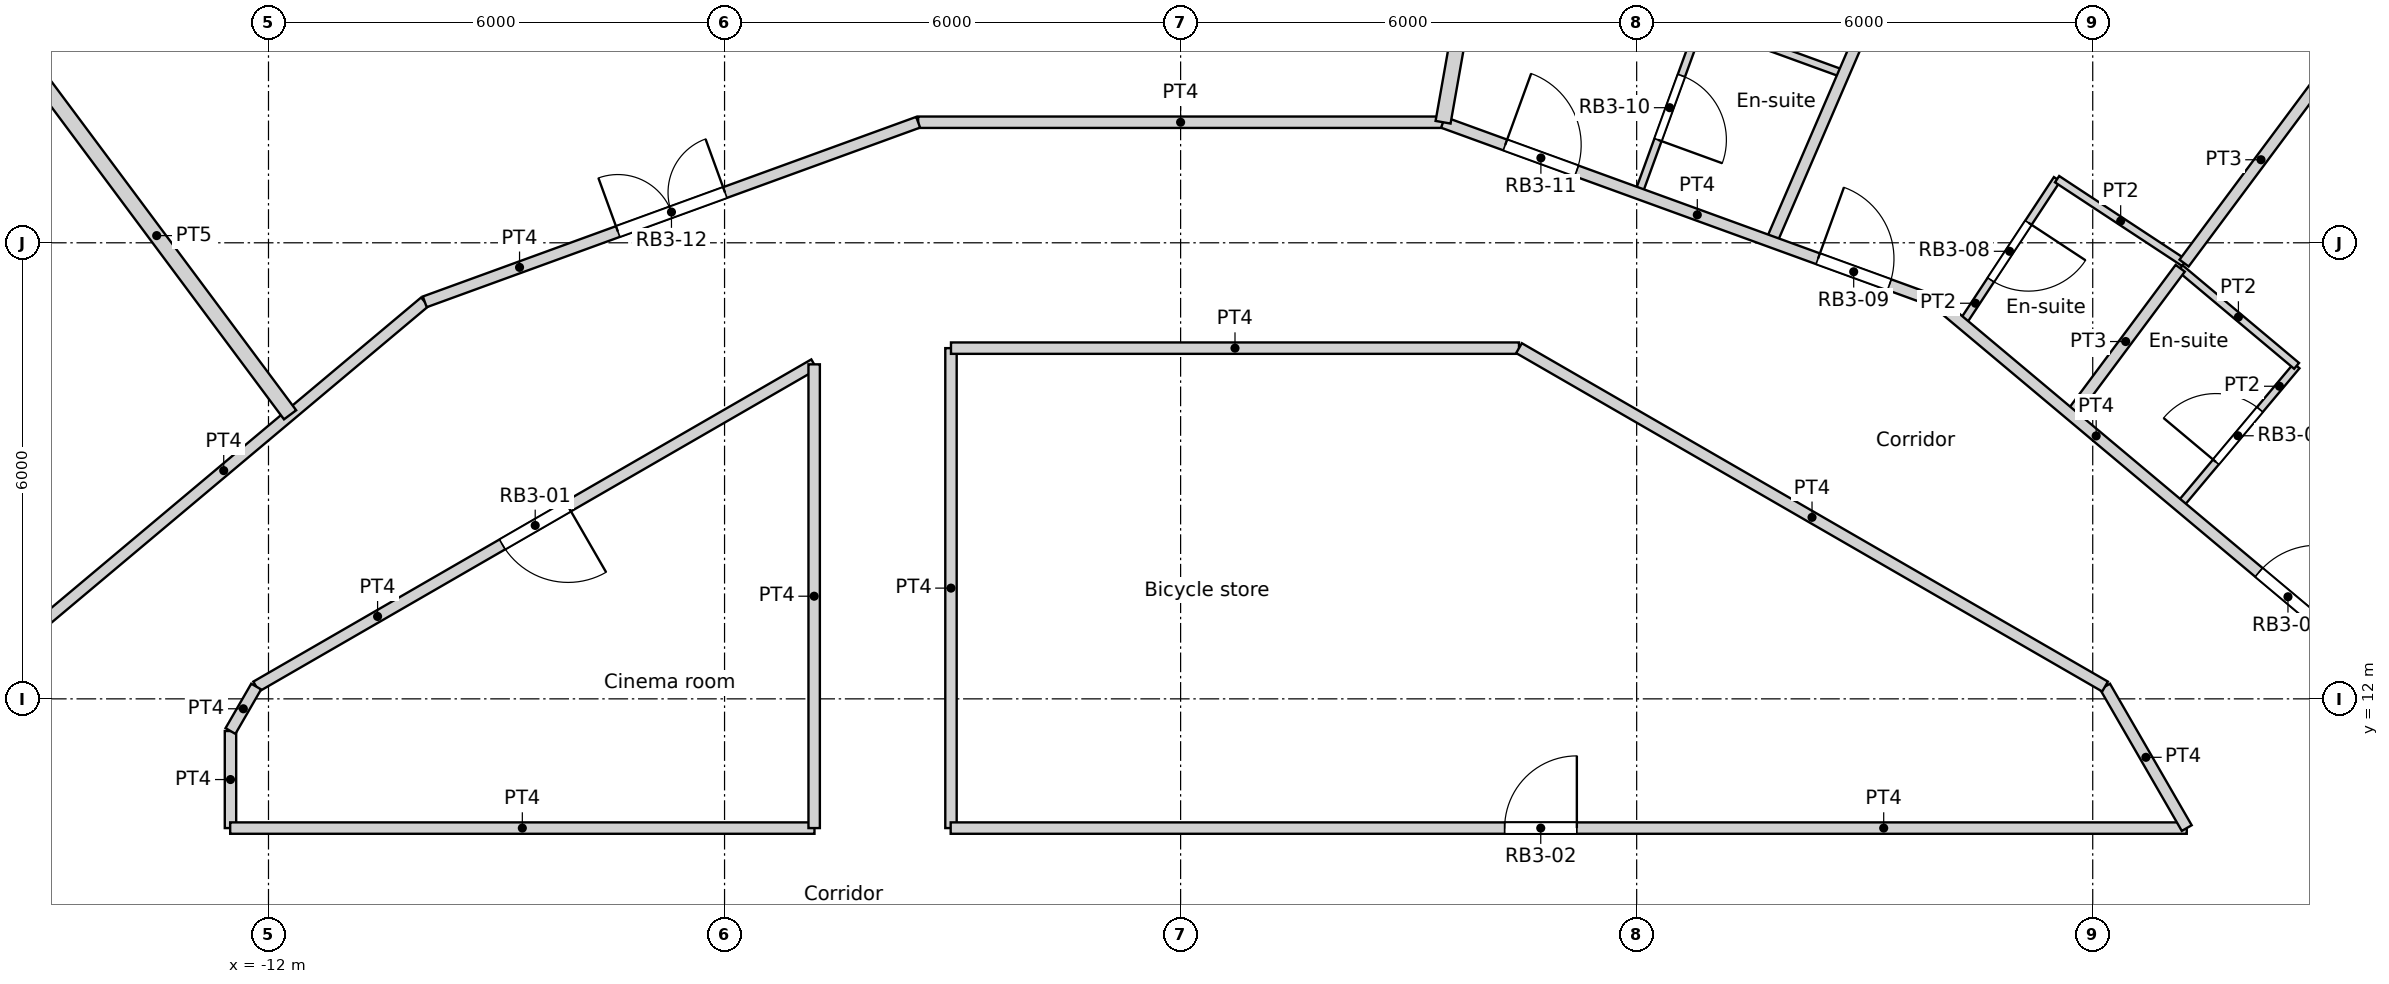
"""IFC4 building model, lengths in metres.
Left out: names, types, materials, properties, quantities, classifications, styles, units other than length and angle.
Written with IfcOpenShell. Run it as: python <this file> out.ifc"""

import sys

from ifc_helpers import new_model, si_unit, direction, frame, frame_2d, origin, origin_2d, place, context, subcontext, project, spatial, rectangle, circle, extrude, element, fill, save


model = new_model("IFC4")
c1 = context("Model", 3, precision=1e-05, world=origin(), true_north=direction((0.0, 1.0)))
c2 = subcontext(c1, "Body", "Model", "MODEL_VIEW")
j1 = project(units=[si_unit("LENGTHUNIT", "METRE"), si_unit("PLANEANGLEUNIT", "RADIAN")], contexts=[c1])
p1 = place(None, origin())
s1 = spatial("IfcSite", under=j1, at=p1, CompositionType="ELEMENT")
p2 = place(p1, origin())
s2 = spatial("IfcBuilding", under=s1, at=p2, CompositionType="ELEMENT")
p3 = place(p2, frame((0.0, 0.0, 147.6)))
s3 = spatial("IfcBuildingStorey", under=s2, at=p3, CompositionType="ELEMENT", Elevation=147.6)
p4 = place(p3, frame((14.659, 19.69, 0.0), z_axis=(0.0, 0.0, 1.0), x_axis=(1.0, 0.0, 0.0)))
e1 = element("IfcColumn", 1, at=p4, inside=s3, PredefinedType="COLUMN", context=c2, shape_type="SweptSolid", body=[
    extrude(circle(Radius=0.6, at=origin_2d()), origin(), (0.0, 0.0, 1.0), 3.6),
])
for number, where, z_axis, x_axis in (
    (2, (11.735, 14.716, 0.0), (0.0, 0.0, 1.0), (1.0, 0.0, 0.0)),
    (3, (6.876, 17.521, 0.0), (0.0, 0.0, 1.0), (1.0, 0.0, 0.0)),
    (4, (1.406, 18.77, 0.0), (0.0, 0.0, 1.0), (1.0, 0.0, 0.0)),
    (5, (-4.188, 18.35, 0.0), (0.0, 0.0, 1.0), (1.0, 0.0, 0.0)),
    (6, (-9.411, 16.301, 0.0), (0.0, 0.0, 1.0), (1.0, 0.0, 0.0)),
    (7, (-13.798, 12.802, 0.0), (0.0, 0.0, 1.0), (1.0, 0.0, 0.0)),
):
    element("IfcColumn", number, at=place(p3, frame(where, z_axis=z_axis, x_axis=x_axis)), inside=s3, PredefinedType="COLUMN", context=c2, shape_type="SweptSolid", body=[
        extrude(circle(Radius=0.65, at=origin_2d()), origin(), (0.0, 0.0, 1.0), 3.6),
    ])
p5 = place(p3, frame((15.316, 20.573, 0.0), z_axis=(0.0, 0.0, 1.0), x_axis=(-0.835508361394, 0.54947773207, 0.0)))
e8 = element("IfcWall", 8, at=p5, inside=s3, PredefinedType="SOLIDWALL", context=c2, shape_type="SweptSolid", body=[
    extrude(rectangle(XDim=2.973, YDim=0.3, at=frame_2d((1.486, 0.0))), origin(), (0.0, 0.0, 1.0), 3.3),
])
p6 = place(p5, frame((1.486, 0.0, 1.55)))
e9 = element("IfcOpeningElement", 9, at=p6, cuts=e8, PredefinedType="OPENING", context=c2, shape_type="SweptSolid", body=[
    extrude(circle(Radius=0.9, at=origin_2d()), frame((0.0, 0.16, 0.0), z_axis=(0.0, -1.0, 0.0), x_axis=(1.0, 0.0, 0.0)), (0.0, 0.0, 1.0), 0.32),
])
p7 = place(p3, frame((-13.132, 22.697, -0.3), z_axis=(0.0, 0.0, 1.0), x_axis=(-0.835514416706, -0.549468524554, 0.0)))
e10 = element("IfcWall", 10, at=p7, inside=s3, PredefinedType="ELEMENTEDWALL", context=c2, shape_type="SweptSolid", body=[
    extrude(rectangle(XDim=3.0, YDim=1.45, at=frame_2d((1.5, 0.0))), origin(), (0.0, 0.0, 1.0), 3.6),
])
p8 = place(p7, frame((1.5, 0.0, 1.85)))
e11 = element("IfcOpeningElement", 11, at=p8, cuts=e10, PredefinedType="OPENING", context=c2, shape_type="SweptSolid", body=[
    extrude(circle(Radius=0.9, at=origin_2d()), frame((0.0, 0.735, 0.0), z_axis=(0.0, -1.0, 0.0), x_axis=(1.0, 0.0, 0.0)), (0.0, 0.0, 1.0), 1.47),
])
p9 = place(p3, frame((-12.504, 10.3, 0.0), z_axis=(0.0, 0.0, 1.0), x_axis=(1.0, 0.0, 0.0)))
e12 = element("IfcWall", 12, at=p9, inside=s3, PredefinedType="PARTITIONING", context=c2, shape_type="SweptSolid", body=[
    extrude(rectangle(XDim=7.687, YDim=0.15, at=frame_2d((3.844, 0.0))), origin(), (0.0, 0.0, 1.0), 3.3),
])
p10 = place(p3, frame((-3.025, 10.3, 0.0), z_axis=(0.0, 0.0, 1.0), x_axis=(1.0, 0.0, 0.0)))
e13 = element("IfcWall", 13, at=p10, inside=s3, PredefinedType="PARTITIONING", context=c2, shape_type="SweptSolid", body=[
    extrude(rectangle(XDim=16.262, YDim=0.15, at=frame_2d((8.131, 0.0))), origin(), (0.0, 0.0, 1.0), 3.3),
])
p11 = place(p10, frame((7.288, 0.0, 0.0)))
e14 = element("IfcOpeningElement", 14, at=p11, cuts=e13, PredefinedType="OPENING", context=c2, shape_type="SweptSolid", body=[
    extrude(rectangle(XDim=0.95, YDim=2.1, at=frame_2d((0.475, 1.05))), frame((0.0, 0.075, 0.0), z_axis=(0.0, -1.0, 0.0), x_axis=(1.0, 0.0, 0.0)), (0.0, 0.0, 1.0), 0.15),
])
p12 = place(p3, frame((12.162, 12.162, 0.0), z_axis=(0.0, 0.0, 1.0), x_axis=(0.499961633463, -0.866047553582, 0.0)))
e15 = element("IfcWall", 15, at=p12, inside=s3, PredefinedType="PARTITIONING", context=c2, shape_type="SweptSolid", body=[
    extrude(rectangle(XDim=2.15, YDim=0.15, at=frame_2d((1.075, 0.0))), origin(), (0.0, 0.0, 1.0), 3.3),
])
p13 = place(p3, frame((9.943, 17.222, 0.0), z_axis=(0.0, 0.0, 1.0), x_axis=(0.766192104565, -0.642611592567, 0.0)))
e16 = element("IfcWall", 16, at=p13, inside=s3, PredefinedType="PARTITIONING", context=c2, shape_type="SweptSolid", body=[
    extrude(rectangle(XDim=6.906, YDim=0.15, at=frame_2d((3.453, 0.0))), origin(), (0.0, 0.0, 1.0), 3.3),
])
p14 = place(p13, frame((5.537, 0.0, 0.0)))
e17 = element("IfcOpeningElement", 17, at=p14, cuts=e16, PredefinedType="OPENING", context=c2, shape_type="SweptSolid", body=[
    extrude(rectangle(XDim=1.0, YDim=2.1, at=frame_2d((0.5, 1.05))), frame((0.0, 0.075, 0.0), z_axis=(0.0, -1.0, 0.0), x_axis=(1.0, 0.0, 0.0)), (0.0, 0.0, 1.0), 0.15),
])
p15 = place(p3, frame((-4.821, 10.3, 0.0), z_axis=(0.0, 0.0, 1.0), x_axis=(0.0, 1.0, 0.0)))
e18 = element("IfcWall", 18, at=p15, inside=s3, PredefinedType="PARTITIONING", context=c2, shape_type="SweptSolid", body=[
    extrude(rectangle(XDim=6.101, YDim=0.15, at=frame_2d((3.05, 0.0))), origin(), (0.0, 0.0, 1.0), 3.3),
])
p16 = place(p3, frame((-12.162, 12.162, 0.0), z_axis=(0.0, 0.0, 1.0), x_axis=(0.866004766557, 0.500035743023, 0.0)))
e19 = element("IfcWall", 19, at=p16, inside=s3, PredefinedType="PARTITIONING", context=c2, shape_type="SweptSolid", body=[
    extrude(rectangle(XDim=8.477, YDim=0.15, at=frame_2d((4.239, 0.0))), origin(), (0.0, 0.0, 1.0), 3.3),
])
p17 = place(p16, frame((3.739, 0.0, 0.0)))
e20 = element("IfcOpeningElement", 20, at=p17, cuts=e19, PredefinedType="OPENING", context=c2, shape_type="SweptSolid", body=[
    extrude(rectangle(XDim=1.0, YDim=2.04, at=frame_2d((0.5, 1.02))), frame((0.0, 0.075, 0.0), z_axis=(0.0, -1.0, 0.0), x_axis=(1.0, 0.0, 0.0)), (0.0, 0.0, 1.0), 0.15),
])
p18 = place(p3, frame((4.452, 16.614, 0.0), z_axis=(0.0, 0.0, 1.0), x_axis=(0.866005203721, -0.500034985904, 0.0)))
e21 = element("IfcWall", 21, at=p18, inside=s3, PredefinedType="PARTITIONING", context=c2, shape_type="SweptSolid", body=[
    extrude(rectangle(XDim=8.903, YDim=0.15, at=frame_2d((4.452, 0.0))), origin(), (0.0, 0.0, 1.0), 3.3),
])
p19 = place(p3, frame((-3.021, 16.614, 0.0), z_axis=(0.0, 0.0, 1.0), x_axis=(1.0, 0.0, 0.0)))
e22 = element("IfcWall", 22, at=p19, inside=s3, PredefinedType="PARTITIONING", context=c2, shape_type="SweptSolid", body=[
    extrude(rectangle(XDim=7.473, YDim=0.15, at=frame_2d((3.736, 0.0))), origin(), (0.0, 0.0, 1.0), 3.3),
])
p20 = place(p3, frame((-3.021, 10.3, 0.0), z_axis=(0.0, 0.0, 1.0), x_axis=(0.0, 1.0, 0.0)))
e23 = element("IfcWall", 23, at=p20, inside=s3, PredefinedType="PARTITIONING", context=c2, shape_type="SweptSolid", body=[
    extrude(rectangle(XDim=6.314, YDim=0.15, at=frame_2d((3.157, 0.0))), origin(), (0.0, 0.0, 1.0), 3.3),
])
p21 = place(p3, frame((3.452, 19.585, 0.0), z_axis=(0.0, 0.0, 1.0), x_axis=(0.939737689664, -0.341896292208, 0.0)))
e24 = element("IfcWall", 24, at=p21, inside=s3, PredefinedType="PARTITIONING", context=c2, shape_type="SweptSolid", body=[
    extrude(rectangle(XDim=6.908, YDim=0.15, at=frame_2d((3.454, 0.0))), origin(), (0.0, 0.0, 1.0), 3.3),
])
p22 = place(p21, frame((5.249, 0.0, 0.0)))
e25 = element("IfcOpeningElement", 25, at=p22, cuts=e24, PredefinedType="OPENING", context=c2, shape_type="SweptSolid", body=[
    extrude(rectangle(XDim=1.0, YDim=2.1, at=frame_2d((0.5, 1.05))), frame((0.0, 0.075, 0.0), z_axis=(0.0, -1.0, 0.0), x_axis=(1.0, 0.0, 0.0)), (0.0, 0.0, 1.0), 0.15),
])
p23 = place(p21, frame((0.87, 0.0, 0.0)))
e26 = element("IfcOpeningElement", 26, at=p23, cuts=e24, PredefinedType="OPENING", context=c2, shape_type="SweptSolid", body=[
    extrude(rectangle(XDim=1.0, YDim=2.1, at=frame_2d((0.5, 1.05))), frame((0.0, 0.075, 0.0), z_axis=(0.0, -1.0, 0.0), x_axis=(1.0, 0.0, 0.0)), (0.0, 0.0, 1.0), 0.15),
])
p24 = place(p3, frame((-15.234, 12.783, 0.0), z_axis=(0.0, 0.0, 1.0), x_axis=(0.765936018543, 0.642916802937, 0.0)))
e27 = element("IfcWall", 27, at=p24, inside=s3, PredefinedType="PARTITIONING", context=c2, shape_type="SweptSolid", body=[
    extrude(rectangle(XDim=6.906, YDim=0.15, at=frame_2d((3.453, 0.0))), origin(), (0.0, 0.0, 1.0), 3.3),
])
p25 = place(p3, frame((-9.944, 17.223, 0.0), z_axis=(0.0, 0.0, 1.0), x_axis=(0.939672634566, 0.342075050021, 0.0)))
e28 = element("IfcWall", 28, at=p25, inside=s3, PredefinedType="PARTITIONING", context=c2, shape_type="SweptSolid", body=[
    extrude(rectangle(XDim=6.908, YDim=0.15, at=frame_2d((3.454, 0.0))), origin(), (0.0, 0.0, 1.0), 3.3),
])
p26 = place(p25, frame((2.704, 0.0, 0.0)))
e29 = element("IfcOpeningElement", 29, at=p26, cuts=e28, PredefinedType="OPENING", context=c2, shape_type="SweptSolid", body=[
    extrude(rectangle(XDim=1.5, YDim=2.1, at=frame_2d((0.75, 1.05))), frame((0.0, 0.075, 0.0), z_axis=(0.0, -1.0, 0.0), x_axis=(1.0, 0.0, 0.0)), (0.0, 0.0, 1.0), 0.15),
])
p27 = place(p3, frame((-3.453, 19.586, 0.0), z_axis=(0.0, 0.0, 1.0), x_axis=(1.0, 0.0, 0.0)))
e30 = element("IfcWall", 30, at=p27, inside=s3, PredefinedType="PARTITIONING", context=c2, shape_type="SweptSolid", body=[
    extrude(rectangle(XDim=6.906, YDim=0.15, at=frame_2d((3.453, 0.0))), origin(), (0.0, 0.0, 1.0), 3.3),
])
p28 = place(p3, frame((-12.5, 11.577, 0.0), z_axis=(0.0, 0.0, 1.0), x_axis=(0.500024767483, 0.866011103799, 0.0)))
e31 = element("IfcWall", 31, at=p28, inside=s3, PredefinedType="PARTITIONING", context=c2, shape_type="SweptSolid", body=[
    extrude(rectangle(XDim=0.676, YDim=0.15, at=frame_2d((0.338, 0.0))), origin(), (0.0, 0.0, 1.0), 3.3),
])
p29 = place(p3, frame((-12.5, 10.3, 0.0), z_axis=(0.0, 0.0, 1.0), x_axis=(0.0, 1.0, 0.0)))
e32 = element("IfcWall", 32, at=p29, inside=s3, PredefinedType="PARTITIONING", context=c2, shape_type="SweptSolid", body=[
    extrude(rectangle(XDim=1.277, YDim=0.15, at=frame_2d((0.638, 0.0))), origin(), (0.0, 0.0, 1.0), 3.3),
])
p30 = place(p3, frame((13.139, 14.542, 0.0), z_axis=(0.0, 0.0, 1.0), x_axis=(0.642731657745, 0.766091388891, 0.0)))
e33 = element("IfcWall", 33, at=p30, inside=s3, PredefinedType="PARTITIONING", context=c2, shape_type="SweptSolid", body=[
    extrude(rectangle(XDim=2.401, YDim=0.1, at=frame_2d((1.2, 0.0))), origin(), (0.0, 0.0, 1.0), 3.3),
])
p31 = place(p30, frame((0.75, 0.0, 0.0)))
e34 = element("IfcOpeningElement", 34, at=p31, cuts=e33, PredefinedType="OPENING", context=c2, shape_type="SweptSolid", body=[
    extrude(rectangle(XDim=0.9, YDim=2.04, at=frame_2d((0.45, 1.02))), frame((0.0, 0.05, 0.0), z_axis=(0.0, -1.0, 0.0), x_axis=(1.0, 0.0, 0.0)), (0.0, 0.0, 1.0), 0.1),
])
p32 = place(p3, frame((13.151, 17.665, 0.0), z_axis=(0.0, 0.0, 1.0), x_axis=(0.766224532916, -0.642572925945, 0.0)))
e35 = element("IfcWall", 35, at=p32, inside=s3, PredefinedType="PARTITIONING", context=c2, shape_type="SweptSolid", body=[
    extrude(rectangle(XDim=1.998, YDim=0.1, at=frame_2d((0.999, 0.0))), origin(), (0.0, 0.0, 1.0), 3.3),
])
p33 = place(p3, frame((13.202, 17.733, 0.0), z_axis=(0.0, 0.0, 1.0), x_axis=(0.597149819296, 0.802129723495, 0.0)))
e36 = element("IfcWall", 36, at=p33, inside=s3, PredefinedType="PARTITIONING", context=c2, shape_type="SweptSolid", body=[
    extrude(rectangle(XDim=3.39, YDim=0.15, at=frame_2d((1.695, 0.0))), origin(), (0.0, 0.0, 1.0), 3.3),
])
p34 = place(p3, frame((11.716, 15.737, 0.0), z_axis=(0.0, 0.0, 1.0), x_axis=(0.597021412293, 0.802225300813, 0.0)))
e37 = element("IfcWall", 37, at=p34, inside=s3, PredefinedType="PARTITIONING", context=c2, shape_type="SweptSolid", body=[
    extrude(rectangle(XDim=2.403, YDim=0.15, at=frame_2d((1.202, 0.0))), origin(), (0.0, 0.0, 1.0), 3.3),
])
p35 = place(p3, frame((11.531, 18.837, 0.0), z_axis=(0.0, 0.0, 1.0), x_axis=(0.835392041163, -0.549654562032, 0.0)))
e38 = element("IfcWall", 38, at=p35, inside=s3, PredefinedType="PARTITIONING", context=c2, shape_type="SweptSolid", body=[
    extrude(rectangle(XDim=2.003, YDim=0.1, at=frame_2d((1.001, 0.0))), origin(), (0.0, 0.0, 1.0), 3.3),
])
p36 = place(p3, frame((10.282, 16.939, 0.0), z_axis=(0.0, 0.0, 1.0), x_axis=(0.549730960803, 0.83534176882, 0.0)))
e39 = element("IfcWall", 39, at=p36, inside=s3, PredefinedType="PARTITIONING", context=c2, shape_type="SweptSolid", body=[
    extrude(rectangle(XDim=2.272, YDim=0.1, at=frame_2d((1.136, 0.0))), origin(), (0.0, 0.0, 1.0), 3.3),
])
p37 = place(p36, frame((0.686, 0.0, 0.0)))
e40 = element("IfcOpeningElement", 40, at=p37, cuts=e39, PredefinedType="OPENING", context=c2, shape_type="SweptSolid", body=[
    extrude(rectangle(XDim=0.9, YDim=2.04, at=frame_2d((0.45, 1.02))), frame((0.0, 0.05, 0.0), z_axis=(0.0, -1.0, 0.0), x_axis=(1.0, 0.0, 0.0)), (0.0, 0.0, 1.0), 0.1),
])
p38 = place(p3, frame((7.772, 18.014, 0.0), z_axis=(0.0, 0.0, 1.0), x_axis=(0.395898183585, 0.918294412612, 0.0)))
e41 = element("IfcWall", 41, at=p38, inside=s3, PredefinedType="PARTITIONING", context=c2, shape_type="SweptSolid", body=[
    extrude(rectangle(XDim=5.879, YDim=0.15, at=frame_2d((2.939, 0.0))), origin(), (0.0, 0.0, 1.0), 3.3),
])
p39 = place(p3, frame((6.845, 20.905, 0.0), z_axis=(0.0, 0.0, 1.0), x_axis=(0.939757747305, -0.341841156651, 0.0)))
e42 = element("IfcWall", 42, at=p39, inside=s3, PredefinedType="PARTITIONING", context=c2, shape_type="SweptSolid", body=[
    extrude(rectangle(XDim=1.998, YDim=0.1, at=frame_2d((0.999, 0.0))), origin(), (0.0, 0.0, 1.0), 3.3),
])
p40 = place(p3, frame((6.024, 18.65, 0.0), z_axis=(0.0, 0.0, 1.0), x_axis=(0.342110593602, 0.939659694648, 0.0)))
e43 = element("IfcWall", 43, at=p40, inside=s3, PredefinedType="PARTITIONING", context=c2, shape_type="SweptSolid", body=[
    extrude(rectangle(XDim=2.4, YDim=0.1, at=frame_2d((1.2, 0.0))), origin(), (0.0, 0.0, 1.0), 3.3),
])
p41 = place(p40, frame((0.75, 0.0, 0.0)))
e44 = element("IfcOpeningElement", 44, at=p41, cuts=e43, PredefinedType="OPENING", context=c2, shape_type="SweptSolid", body=[
    extrude(rectangle(XDim=0.9, YDim=2.04, at=frame_2d((0.45, 1.02))), frame((0.0, 0.05, 0.0), z_axis=(0.0, -1.0, 0.0), x_axis=(1.0, 0.0, 0.0)), (0.0, 0.0, 1.0), 0.1),
])
p42 = place(p3, frame((3.453, 19.586, 0.0), z_axis=(0.0, 0.0, 1.0), x_axis=(0.17382754149, 0.984776109489, 0.0)))
e45 = element("IfcWall", 45, at=p42, inside=s3, PredefinedType="PARTITIONING", context=c2, shape_type="SweptSolid", body=[
    extrude(rectangle(XDim=5.61, YDim=0.2, at=frame_2d((2.805, 0.0))), origin(), (0.0, 0.0, 1.0), 3.3),
])
p43 = place(p3, frame((-15.226, 20.452, 0.0), z_axis=(0.0, 0.0, 1.0), x_axis=(0.597151875745, -0.802128192557, 0.0)))
e46 = element("IfcWall", 46, at=p43, inside=s3, PredefinedType="PARTITIONING", context=c2, shape_type="SweptSolid", body=[
    extrude(rectangle(XDim=5.878, YDim=0.2, at=frame_2d((2.939, 0.0))), origin(), (0.0, 0.0, 1.0), 3.3),
])
p44 = place(p17, origin())
e47 = element("IfcDoor", 47, at=p44, inside=s3, OperationType="SINGLE_SWING_LEFT", PredefinedType="DOOR", context=c2, shape_type="SweptSolid", body=[
    extrude(rectangle(XDim=1.0, YDim=2.04, at=frame_2d((0.5, 1.02))), frame((0.0, 0.025, 0.0), z_axis=(0.0, -1.0, 0.0), x_axis=(1.0, 0.0, 0.0)), (0.0, 0.0, 1.0), 0.05),
])
fill(e20, e47)
p45 = place(p11, origin())
e48 = element("IfcDoor", 48, at=p45, inside=s3, OperationType="SINGLE_SWING_RIGHT", PredefinedType="DOOR", context=c2, shape_type="SweptSolid", body=[
    extrude(rectangle(XDim=0.95, YDim=2.1, at=frame_2d((0.475, 1.05))), frame((0.0, 0.025, 0.0), z_axis=(0.0, -1.0, 0.0), x_axis=(1.0, 0.0, 0.0)), (0.0, 0.0, 1.0), 0.05),
])
fill(e14, e48)
p46 = place(p31, origin())
e49 = element("IfcDoor", 49, at=p46, inside=s3, OperationType="SINGLE_SWING_LEFT", PredefinedType="DOOR", context=c2, shape_type="SweptSolid", body=[
    extrude(rectangle(XDim=0.9, YDim=2.04, at=frame_2d((0.45, 1.02))), frame((0.0, 0.025, 0.0), z_axis=(0.0, -1.0, 0.0), x_axis=(1.0, 0.0, 0.0)), (0.0, 0.0, 1.0), 0.05),
])
fill(e34, e49)
p47 = place(p14, origin())
e50 = element("IfcDoor", 50, at=p47, inside=s3, OperationType="SINGLE_SWING_RIGHT", PredefinedType="DOOR", context=c2, shape_type="SweptSolid", body=[
    extrude(rectangle(XDim=1.0, YDim=2.1, at=frame_2d((0.5, 1.05))), frame((0.0, 0.025, 0.0), z_axis=(0.0, -1.0, 0.0), x_axis=(1.0, 0.0, 0.0)), (0.0, 0.0, 1.0), 0.05),
])
fill(e17, e50)
p48 = place(p37, origin())
e51 = element("IfcDoor", 51, at=p48, inside=s3, OperationType="SINGLE_SWING_LEFT", PredefinedType="DOOR", context=c2, shape_type="SweptSolid", body=[
    extrude(rectangle(XDim=0.9, YDim=2.04, at=frame_2d((0.45, 1.02))), frame((0.0, 0.025, 0.0), z_axis=(0.0, -1.0, 0.0), x_axis=(1.0, 0.0, 0.0)), (0.0, 0.0, 1.0), 0.05),
])
fill(e40, e51)
p49 = place(p22, origin())
e52 = element("IfcDoor", 52, at=p49, inside=s3, OperationType="SINGLE_SWING_LEFT", PredefinedType="DOOR", context=c2, shape_type="SweptSolid", body=[
    extrude(rectangle(XDim=1.0, YDim=2.1, at=frame_2d((0.5, 1.05))), frame((0.0, 0.025, 0.0), z_axis=(0.0, -1.0, 0.0), x_axis=(1.0, 0.0, 0.0)), (0.0, 0.0, 1.0), 0.05),
])
fill(e25, e52)
p50 = place(p41, origin())
e53 = element("IfcDoor", 53, at=p50, inside=s3, OperationType="SINGLE_SWING_RIGHT", PredefinedType="DOOR", context=c2, shape_type="SweptSolid", body=[
    extrude(rectangle(XDim=0.9, YDim=2.04, at=frame_2d((0.45, 1.02))), frame((0.0, 0.025, 0.0), z_axis=(0.0, -1.0, 0.0), x_axis=(1.0, 0.0, 0.0)), (0.0, 0.0, 1.0), 0.05),
])
fill(e44, e53)
p51 = place(p23, origin())
e54 = element("IfcDoor", 54, at=p51, inside=s3, OperationType="SINGLE_SWING_LEFT", PredefinedType="DOOR", context=c2, shape_type="SweptSolid", body=[
    extrude(rectangle(XDim=1.0, YDim=2.1, at=frame_2d((0.5, 1.05))), frame((0.0, 0.025, 0.0), z_axis=(0.0, -1.0, 0.0), x_axis=(1.0, 0.0, 0.0)), (0.0, 0.0, 1.0), 0.05),
])
fill(e26, e54)
p52 = place(p26, origin())
e55 = element("IfcDoor", 55, at=p52, inside=s3, OperationType="DOUBLE_DOOR_SINGLE_SWING", PredefinedType="DOOR", context=c2, shape_type="SweptSolid", body=[
    extrude(rectangle(XDim=1.5, YDim=2.1, at=frame_2d((0.75, 1.05))), frame((0.0, 0.025, 0.0), z_axis=(0.0, -1.0, 0.0), x_axis=(1.0, 0.0, 0.0)), (0.0, 0.0, 1.0), 0.05),
])
fill(e29, e55)
save(model, sys.argv[1])
